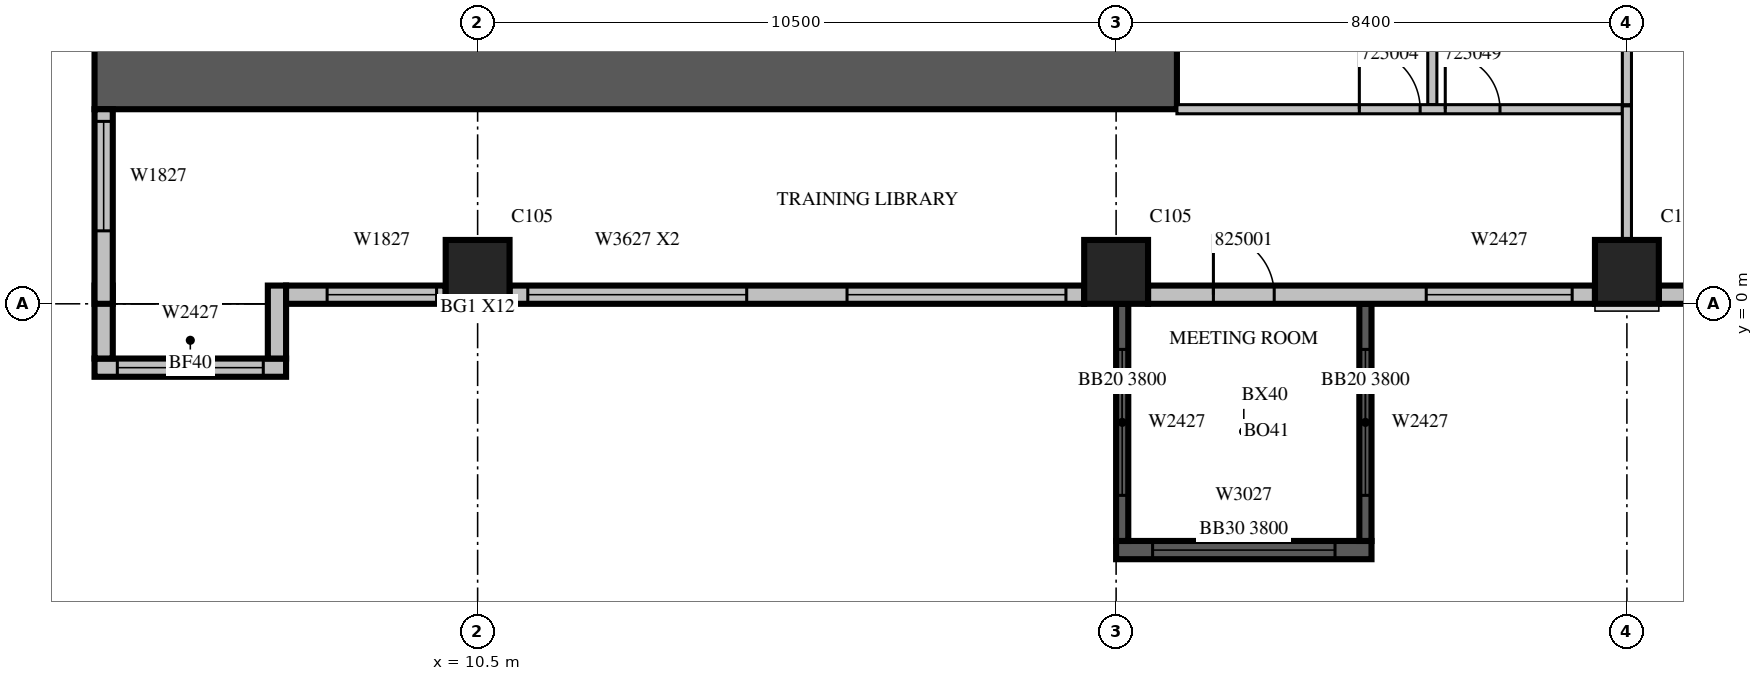
"""IFC4 building model, lengths in metres.
Left out: names, types, materials, properties, quantities, classifications, styles, units other than length and angle.
Written with IfcOpenShell. Run it as: python <this file> out.ifc"""

import sys

from ifc_helpers import new_model, si_unit, direction, frame, frame_2d, origin, origin_2d, place, context, subcontext, project, spatial, rectangle, extrude, source, transform, mapped, element, fill, save


model = new_model("IFC4")
c1 = context("Model", 3, precision=1e-05, world=origin(), true_north=direction((0.0, 1.0)))
c2 = subcontext(c1, "Body", "Model", "MODEL_VIEW")
j1 = project(units=[si_unit("LENGTHUNIT", "METRE"), si_unit("PLANEANGLEUNIT", "RADIAN")], contexts=[c1])
p1 = place(None, origin())
s1 = spatial("IfcSite", under=j1, at=p1, CompositionType="ELEMENT")
p2 = place(p1, origin())
s2 = spatial("IfcBuilding", under=s1, at=p2, CompositionType="ELEMENT")
p3 = place(p2, frame((0.0, 0.0, 116.1)))
s3 = spatial("IfcBuildingStorey", under=s2, at=p3, CompositionType="ELEMENT", Elevation=116.1)
m1 = source(origin(), c2, "Body", "SweptSolid", [
    extrude(rectangle(XDim=1.05, YDim=1.05, at=origin_2d()), origin(), (0.0, 0.0, 1.0), 4.2),
])
for number, where, z_axis, x_axis in (
    (1, (10.5, 0.525, 0.0), (0.0, 0.0, 1.0), (1.0, 0.0, 0.0)),
    (2, (21.0, 0.525, 0.0), (0.0, 0.0, 1.0), (1.0, 0.0, 0.0)),
    (3, (29.4, 0.525, 0.0), (0.0, 0.0, 1.0), (1.0, 0.0, 0.0)),
):
    element("IfcColumn", number, at=place(p3, frame(where, z_axis=z_axis, x_axis=x_axis)), inside=s3, PredefinedType="COLUMN", context=c2, shape_type="MappedRepresentation", body=[
        mapped(m1, transform((0.0, 0.0, 0.0), scale=1.0)),
    ])
m2 = source(origin(), c2, "Body", "SweptSolid", [
    extrude(rectangle(XDim=17.8, YDim=1.0, at=frame_2d((8.9, 0.0))), origin(), (0.0, 0.0, 1.0), 4.2),
])
p4 = place(p3, frame((4.2, 3.7, 0.0), z_axis=(0.0, 0.0, 1.0), x_axis=(1.0, 0.0, 0.0)))
e4 = element("IfcWall", 4, at=p4, inside=s3, PredefinedType="SHEAR", context=c2, shape_type="MappedRepresentation", body=[
    mapped(m2, transform((0.0, 0.0, 0.0), scale=1.0)),
])
m3 = source(origin(), c2, "Body", "SweptSolid", [
    extrude(rectangle(XDim=4.2, YDim=0.3, at=frame_2d((2.1, 0.0))), origin(), (0.0, 0.0, 1.0), 3.8),
])
p5 = place(p3, frame((21.0, -4.05, 0.0), z_axis=(0.0, 0.0, 1.0), x_axis=(1.0, 0.0, 0.0)))
e5 = element("IfcWall", 5, at=p5, inside=s3, PredefinedType="SOLIDWALL", context=c2, shape_type="MappedRepresentation", body=[
    mapped(m3, transform((0.0, 0.0, 0.0), scale=1.0)),
])
m4 = source(origin(), c2, "Body", "SweptSolid", [
    extrude(rectangle(XDim=3.0, YDim=2.7, at=frame_2d((1.5, 1.35))), frame((0.0, 0.16, 0.0), z_axis=(0.0, -1.0, 0.0), x_axis=(1.0, 0.0, 0.0)), (0.0, 0.0, 1.0), 0.32),
])
p6 = place(p5, frame((0.6, 0.0, 0.6)))
e6 = element("IfcOpeningElement", 6, at=p6, cuts=e5, PredefinedType="OPENING", context=c2, shape_type="MappedRepresentation", body=[
    mapped(m4, transform((0.0, 0.0, 0.0), scale=1.0)),
])
m5 = source(origin(), c2, "Body", "SweptSolid", [
    extrude(rectangle(XDim=3.9, YDim=0.2, at=frame_2d((1.95, 0.0))), origin(), (0.0, 0.0, 1.0), 3.8),
])
p7 = place(p3, frame((21.1, 0.0, 0.0), z_axis=(0.0, 0.0, 1.0), x_axis=(0.0, -1.0, 0.0)))
e7 = element("IfcWall", 7, at=p7, inside=s3, PredefinedType="SOLIDWALL", context=c2, shape_type="MappedRepresentation", body=[
    mapped(m5, transform((0.0, 0.0, 0.0), scale=1.0)),
])
m6 = source(origin(), c2, "Body", "SweptSolid", [
    extrude(rectangle(XDim=2.4, YDim=2.7, at=frame_2d((1.2, 1.35))), frame((0.0, 0.11, 0.0), z_axis=(0.0, -1.0, 0.0), x_axis=(1.0, 0.0, 0.0)), (0.0, 0.0, 1.0), 0.22),
])
p8 = place(p7, frame((0.75, 0.0, 0.6)))
e8 = element("IfcOpeningElement", 8, at=p8, cuts=e7, PredefinedType="OPENING", context=c2, shape_type="MappedRepresentation", body=[
    mapped(m6, transform((0.0, 0.0, 0.0), scale=1.0)),
])
p9 = place(p3, frame((25.1, 0.0, 0.0), z_axis=(0.0, 0.0, 1.0), x_axis=(0.0, -1.0, 0.0)))
e9 = element("IfcWall", 9, at=p9, inside=s3, PredefinedType="SOLIDWALL", context=c2, shape_type="MappedRepresentation", body=[
    mapped(m5, transform((0.0, 0.0, 0.0), scale=1.0)),
])
p10 = place(p9, frame((0.75, 0.0, 0.6)))
e10 = element("IfcOpeningElement", 10, at=p10, cuts=e9, PredefinedType="OPENING", context=c2, shape_type="MappedRepresentation", body=[
    mapped(m6, transform((0.0, 0.0, 0.0), scale=1.0)),
])
m7 = source(origin(), c2, "Body", "SweptSolid", [
    extrude(rectangle(XDim=3.15, YDim=0.3, at=frame_2d((1.575, 0.0))), origin(), (0.0, 0.0, 1.0), 3.8),
])
p11 = place(p3, frame((4.2, -1.05, 0.0), z_axis=(0.0, 0.0, 1.0), x_axis=(1.0, 0.0, 0.0)))
e11 = element("IfcWall", 11, at=p11, inside=s3, PredefinedType="STANDARD", context=c2, shape_type="MappedRepresentation", body=[
    mapped(m7, transform((0.0, 0.0, 0.0), scale=1.0)),
])
m8 = source(origin(), c2, "Body", "SweptSolid", [
    extrude(rectangle(XDim=2.4, YDim=2.7, at=frame_2d((1.2, 1.35))), frame((0.0, 0.16, 0.0), z_axis=(0.0, -1.0, 0.0), x_axis=(1.0, 0.0, 0.0)), (0.0, 0.0, 1.0), 0.32),
])
p12 = place(p11, frame((0.375, 0.0, 0.6)))
e12 = element("IfcOpeningElement", 12, at=p12, cuts=e11, PredefinedType="OPENING", context=c2, shape_type="MappedRepresentation", body=[
    mapped(m8, transform((0.0, 0.0, 0.0), scale=1.0)),
])
m9 = source(origin(), c2, "Body", "SweptSolid", [
    extrude(rectangle(XDim=1.2, YDim=0.3, at=frame_2d((0.6, 0.0))), origin(), (0.0, 0.0, 1.0), 3.8),
])
for number, where, z_axis, x_axis in (
    (13, (4.35, 0.3, 0.0), (0.0, 0.0, 1.0), (0.0, -1.0, 0.0)),
    (14, (7.2, 0.3, 0.0), (0.0, 0.0, 1.0), (0.0, -1.0, 0.0)),
):
    element("IfcWall", number, at=place(p3, frame(where, z_axis=z_axis, x_axis=x_axis)), inside=s3, PredefinedType="STANDARD", context=c2, shape_type="MappedRepresentation", body=[
        mapped(m9, transform((0.0, 0.0, 0.0), scale=1.0)),
    ])
m10 = source(origin(), c2, "Body", "SweptSolid", [
    extrude(rectangle(XDim=2.625, YDim=0.3, at=frame_2d((1.312, 0.0))), origin(), (0.0, 0.0, 1.0), 3.8),
])
p13 = place(p3, frame((7.35, 0.15, 0.0), z_axis=(0.0, 0.0, 1.0), x_axis=(1.0, 0.0, 0.0)))
e15 = element("IfcWall", 15, at=p13, inside=s3, PredefinedType="STANDARD", context=c2, shape_type="MappedRepresentation", body=[
    mapped(m10, transform((0.0, 0.0, 0.0), scale=1.0)),
])
m11 = source(origin(), c2, "Body", "SweptSolid", [
    extrude(rectangle(XDim=1.8, YDim=2.7, at=frame_2d((0.9, 1.35))), frame((0.0, 0.16, 0.0), z_axis=(0.0, -1.0, 0.0), x_axis=(1.0, 0.0, 0.0)), (0.0, 0.0, 1.0), 0.32),
])
p14 = place(p13, frame((0.675, 0.0, 0.6)))
e16 = element("IfcOpeningElement", 16, at=p14, cuts=e15, PredefinedType="OPENING", context=c2, shape_type="MappedRepresentation", body=[
    mapped(m11, transform((0.0, 0.0, 0.0), scale=1.0)),
])
m12 = source(origin(), c2, "Body", "SweptSolid", [
    extrude(rectangle(XDim=9.45, YDim=0.3, at=frame_2d((4.725, 0.0))), origin(), (0.0, 0.0, 1.0), 3.8),
])
p15 = place(p3, frame((11.025, 0.15, 0.0), z_axis=(0.0, 0.0, 1.0), x_axis=(1.0, 0.0, 0.0)))
e17 = element("IfcWall", 17, at=p15, inside=s3, PredefinedType="STANDARD", context=c2, shape_type="MappedRepresentation", body=[
    mapped(m12, transform((0.0, 0.0, 0.0), scale=1.0)),
])
m13 = source(origin(), c2, "Body", "SweptSolid", [
    extrude(rectangle(XDim=3.6, YDim=2.7, at=frame_2d((1.8, 1.35))), frame((0.0, 0.16, 0.0), z_axis=(0.0, -1.0, 0.0), x_axis=(1.0, 0.0, 0.0)), (0.0, 0.0, 1.0), 0.32),
])
p16 = place(p15, frame((0.3, 0.0, 0.6)))
e18 = element("IfcOpeningElement", 18, at=p16, cuts=e17, PredefinedType="OPENING", context=c2, shape_type="MappedRepresentation", body=[
    mapped(m13, transform((0.0, 0.0, 0.0), scale=1.0)),
])
p17 = place(p15, frame((5.55, 0.0, 0.6)))
e19 = element("IfcOpeningElement", 19, at=p17, cuts=e17, PredefinedType="OPENING", context=c2, shape_type="MappedRepresentation", body=[
    mapped(m13, transform((0.0, 0.0, 0.0), scale=1.0)),
])
m14 = source(origin(), c2, "Body", "SweptSolid", [
    extrude(rectangle(XDim=7.35, YDim=0.3, at=frame_2d((3.675, 0.0))), origin(), (0.0, 0.0, 1.0), 3.8),
])
p18 = place(p3, frame((21.525, 0.15, 0.0), z_axis=(0.0, 0.0, 1.0), x_axis=(1.0, 0.0, 0.0)))
e20 = element("IfcWall", 20, at=p18, inside=s3, PredefinedType="STANDARD", context=c2, shape_type="MappedRepresentation", body=[
    mapped(m14, transform((0.0, 0.0, 0.0), scale=1.0)),
])
p19 = place(p18, frame((4.575, 0.0, 0.6)))
e21 = element("IfcOpeningElement", 21, at=p19, cuts=e20, PredefinedType="OPENING", context=c2, shape_type="MappedRepresentation", body=[
    mapped(m8, transform((0.0, 0.0, 0.0), scale=1.0)),
])
m15 = source(origin(), c2, "Body", "SweptSolid", [
    extrude(rectangle(XDim=1.0, YDim=2.1, at=frame_2d((0.5, 1.05))), frame((0.0, 0.16, 0.0), z_axis=(0.0, -1.0, 0.0), x_axis=(1.0, 0.0, 0.0)), (0.0, 0.0, 1.0), 0.32),
])
p20 = place(p18, frame((1.075, 0.0, 0.0)))
e22 = element("IfcOpeningElement", 22, at=p20, cuts=e20, PredefinedType="OPENING", context=c2, shape_type="MappedRepresentation", body=[
    mapped(m15, transform((0.0, 0.0, 0.0), scale=1.0)),
])
p21 = place(p3, frame((29.925, 0.15, 0.0), z_axis=(0.0, 0.0, 1.0), x_axis=(1.0, 0.0, 0.0)))
e23 = element("IfcWall", 23, at=p21, inside=s3, PredefinedType="STANDARD", context=c2, shape_type="MappedRepresentation", body=[
    mapped(m14, transform((0.0, 0.0, 0.0), scale=1.0)),
])
m16 = source(origin(), c2, "Body", "SweptSolid", [
    extrude(rectangle(XDim=3.2, YDim=0.3, at=frame_2d((1.6, 0.0))), origin(), (0.0, 0.0, 1.0), 3.8),
])
p22 = place(p3, frame((4.35, 3.2, 0.0), z_axis=(0.0, 0.0, 1.0), x_axis=(0.0, -1.0, 0.0)))
e24 = element("IfcWall", 24, at=p22, inside=s3, PredefinedType="STANDARD", context=c2, shape_type="MappedRepresentation", body=[
    mapped(m16, transform((0.0, 0.0, 0.0), scale=1.0)),
])
p23 = place(p22, frame((0.2, 0.0, 0.6)))
e25 = element("IfcOpeningElement", 25, at=p23, cuts=e24, PredefinedType="OPENING", context=c2, shape_type="MappedRepresentation", body=[
    mapped(m11, transform((0.0, 0.0, 0.0), scale=1.0)),
])
p24 = place(p3, frame((26.2, 15.0, 0.0), z_axis=(0.0, 0.0, 1.0), x_axis=(0.0, -1.0, 0.0)))
e26 = element("IfcWall", 26, at=p24, inside=s3, PredefinedType="PARTITIONING", context=c2, shape_type="SweptSolid", body=[
    extrude(rectangle(XDim=11.725, YDim=0.15, at=frame_2d((5.862, 0.0))), origin(), (0.0, 0.0, 1.0), 3.8),
])
m17 = source(origin(), c2, "Body", "SweptSolid", [
    extrude(rectangle(XDim=0.9, YDim=2.1, at=frame_2d((0.45, 1.05))), frame((0.0, 0.085, 0.0), z_axis=(0.0, -1.0, 0.0), x_axis=(1.0, 0.0, 0.0)), (0.0, 0.0, 1.0), 0.17),
])
p25 = place(p24, frame((8.262, 0.0, 0.0)))
e27 = element("IfcOpeningElement", 27, at=p25, cuts=e26, PredefinedType="OPENING", context=c2, shape_type="MappedRepresentation", body=[
    mapped(m17, transform((0.0, 0.0, 0.0), scale=1.0)),
])
p26 = place(p24, frame((1.525, 0.0, 0.0)))
e28 = element("IfcOpeningElement", 28, at=p26, cuts=e26, PredefinedType="OPENING", context=c2, shape_type="MappedRepresentation", body=[
    mapped(m17, transform((0.0, 0.0, 0.0), scale=1.0)),
])
m18 = source(origin(), c2, "Body", "SweptSolid", [
    extrude(rectangle(XDim=6.701, YDim=0.15, at=frame_2d((3.35, 0.0))), origin(), (0.0, 0.0, 1.0), 3.8),
])
p27 = place(p3, frame((29.4, 3.275, 0.0), z_axis=(0.0, 0.0, 1.0), x_axis=(0.0, 1.0, 0.0)))
e29 = element("IfcWall", 29, at=p27, inside=s3, PredefinedType="PARTITIONING", context=c2, shape_type="MappedRepresentation", body=[
    mapped(m18, transform((0.0, 0.0, 0.0), scale=1.0)),
])
m19 = source(origin(), c2, "Body", "SweptSolid", [
    extrude(rectangle(XDim=7.325, YDim=0.15, at=frame_2d((3.663, 0.0))), origin(), (0.0, 0.0, 1.0), 3.8),
])
p28 = place(p3, frame((22.0, 3.2, 0.0), z_axis=(0.0, 0.0, 1.0), x_axis=(1.0, 0.0, 0.0)))
e30 = element("IfcWall", 30, at=p28, inside=s3, PredefinedType="PARTITIONING", context=c2, shape_type="MappedRepresentation", body=[
    mapped(m19, transform((0.0, 0.0, 0.0), scale=1.0)),
])
m20 = source(origin(), c2, "Body", "SweptSolid", [
    extrude(rectangle(XDim=1.0, YDim=2.1, at=frame_2d((0.5, 1.05))), frame((0.0, 0.085, 0.0), z_axis=(0.0, -1.0, 0.0), x_axis=(1.0, 0.0, 0.0)), (0.0, 0.0, 1.0), 0.17),
])
p29 = place(p28, frame((3.0, 0.0, 0.0)))
e31 = element("IfcOpeningElement", 31, at=p29, cuts=e30, PredefinedType="OPENING", context=c2, shape_type="MappedRepresentation", body=[
    mapped(m20, transform((0.0, 0.0, 0.0), scale=1.0)),
])
p30 = place(p28, frame((4.413, 0.0, 0.0)))
e32 = element("IfcOpeningElement", 32, at=p30, cuts=e30, PredefinedType="OPENING", context=c2, shape_type="MappedRepresentation", body=[
    mapped(m17, transform((0.0, 0.0, 0.0), scale=1.0)),
])
m21 = source(origin(), c2, "Body", "SweptSolid", [
    extrude(rectangle(XDim=2.206, YDim=0.15, at=frame_2d((1.103, 0.0))), origin(), (0.0, 0.0, 1.0), 3.8),
])
p31 = place(p3, frame((29.4, 1.049, 0.0), z_axis=(0.0, 0.0, 1.0), x_axis=(0.0, 1.0, 0.0)))
e33 = element("IfcWall", 33, at=p31, inside=s3, PredefinedType="PARTITIONING", context=c2, shape_type="MappedRepresentation", body=[
    mapped(m21, transform((0.0, 0.0, 0.0), scale=1.0)),
])
m22 = source(origin(), c2, "Body", "SweptSolid", [
    extrude(rectangle(XDim=3.0, YDim=2.7, at=frame_2d((1.5, 1.35))), frame((0.0, 0.03, 0.0), z_axis=(0.0, -1.0, 0.0), x_axis=(1.0, 0.0, 0.0)), (0.0, 0.0, 1.0), 0.06),
])
p32 = place(p6, origin())
e34 = element("IfcWindow", 34, at=p32, inside=s3, PartitioningType="SINGLE_PANEL", PredefinedType="WINDOW", context=c2, shape_type="MappedRepresentation", body=[
    mapped(m22, transform((0.0, 0.0, 0.0), scale=1.0)),
])
fill(e6, e34)
m23 = source(origin(), c2, "Body", "SweptSolid", [
    extrude(rectangle(XDim=2.4, YDim=2.7, at=frame_2d((1.2, 1.35))), frame((0.0, 0.03, 0.0), z_axis=(0.0, -1.0, 0.0), x_axis=(1.0, 0.0, 0.0)), (0.0, 0.0, 1.0), 0.06),
])
p33 = place(p8, origin())
e35 = element("IfcWindow", 35, at=p33, inside=s3, PartitioningType="SINGLE_PANEL", PredefinedType="WINDOW", context=c2, shape_type="MappedRepresentation", body=[
    mapped(m23, transform((0.0, 0.0, 0.0), scale=1.0)),
])
fill(e8, e35)
p34 = place(p10, origin())
e36 = element("IfcWindow", 36, at=p34, inside=s3, PartitioningType="SINGLE_PANEL", PredefinedType="WINDOW", context=c2, shape_type="MappedRepresentation", body=[
    mapped(m23, transform((0.0, 0.0, 0.0), scale=1.0)),
])
fill(e10, e36)
p35 = place(p12, origin())
e37 = element("IfcWindow", 37, at=p35, inside=s3, PartitioningType="SINGLE_PANEL", PredefinedType="WINDOW", context=c2, shape_type="MappedRepresentation", body=[
    mapped(m23, transform((0.0, 0.0, 0.0), scale=1.0)),
])
fill(e12, e37)
m24 = source(origin(), c2, "Body", "SweptSolid", [
    extrude(rectangle(XDim=1.8, YDim=2.7, at=frame_2d((0.9, 1.35))), frame((0.0, 0.03, 0.0), z_axis=(0.0, -1.0, 0.0), x_axis=(1.0, 0.0, 0.0)), (0.0, 0.0, 1.0), 0.06),
])
p36 = place(p14, origin())
e38 = element("IfcWindow", 38, at=p36, inside=s3, PartitioningType="SINGLE_PANEL", PredefinedType="WINDOW", context=c2, shape_type="MappedRepresentation", body=[
    mapped(m24, transform((0.0, 0.0, 0.0), scale=1.0)),
])
fill(e16, e38)
m25 = source(origin(), c2, "Body", "SweptSolid", [
    extrude(rectangle(XDim=3.6, YDim=2.7, at=frame_2d((1.8, 1.35))), frame((0.0, 0.03, 0.0), z_axis=(0.0, -1.0, 0.0), x_axis=(1.0, 0.0, 0.0)), (0.0, 0.0, 1.0), 0.06),
])
p37 = place(p16, origin())
e39 = element("IfcWindow", 39, at=p37, inside=s3, PartitioningType="SINGLE_PANEL", PredefinedType="WINDOW", context=c2, shape_type="MappedRepresentation", body=[
    mapped(m25, transform((0.0, 0.0, 0.0), scale=1.0)),
])
fill(e18, e39)
p38 = place(p17, origin())
e40 = element("IfcWindow", 40, at=p38, inside=s3, PartitioningType="SINGLE_PANEL", PredefinedType="WINDOW", context=c2, shape_type="MappedRepresentation", body=[
    mapped(m25, transform((0.0, 0.0, 0.0), scale=1.0)),
])
fill(e19, e40)
p39 = place(p19, origin())
e41 = element("IfcWindow", 41, at=p39, inside=s3, PartitioningType="SINGLE_PANEL", PredefinedType="WINDOW", context=c2, shape_type="MappedRepresentation", body=[
    mapped(m23, transform((0.0, 0.0, 0.0), scale=1.0)),
])
fill(e21, e41)
p40 = place(p23, origin())
e42 = element("IfcWindow", 42, at=p40, inside=s3, PartitioningType="SINGLE_PANEL", PredefinedType="WINDOW", context=c2, shape_type="MappedRepresentation", body=[
    mapped(m24, transform((0.0, 0.0, 0.0), scale=1.0)),
])
fill(e25, e42)
m26 = source(origin(), c2, "Body", "SweptSolid", [
    extrude(rectangle(XDim=1.0, YDim=2.1, at=frame_2d((0.5, 1.05))), frame((0.0, 0.025, 0.0), z_axis=(0.0, -1.0, 0.0), x_axis=(1.0, 0.0, 0.0)), (0.0, 0.0, 1.0), 0.05),
])
p41 = place(p29, origin())
e43 = element("IfcDoor", 43, at=p41, inside=s3, OperationType="SINGLE_SWING_LEFT", PredefinedType="DOOR", context=c2, shape_type="MappedRepresentation", body=[
    mapped(m26, transform((0.0, 0.0, 0.0), scale=1.0)),
])
fill(e31, e43)
m27 = source(origin(), c2, "Body", "SweptSolid", [
    extrude(rectangle(XDim=0.9, YDim=2.1, at=frame_2d((0.45, 1.05))), frame((0.0, 0.025, 0.0), z_axis=(0.0, -1.0, 0.0), x_axis=(1.0, 0.0, 0.0)), (0.0, 0.0, 1.0), 0.05),
])
p42 = place(p30, origin())
e44 = element("IfcDoor", 44, at=p42, inside=s3, OperationType="SINGLE_SWING_LEFT", PredefinedType="DOOR", context=c2, shape_type="MappedRepresentation", body=[
    mapped(m27, transform((0.0, 0.0, 0.0), scale=1.0)),
])
fill(e32, e44)
p43 = place(p20, origin())
e45 = element("IfcDoor", 45, at=p43, inside=s3, OperationType="SINGLE_SWING_LEFT", PredefinedType="DOOR", context=c2, shape_type="MappedRepresentation", body=[
    mapped(m26, transform((0.0, 0.0, 0.0), scale=1.0)),
])
fill(e22, e45)
save(model, sys.argv[1])
